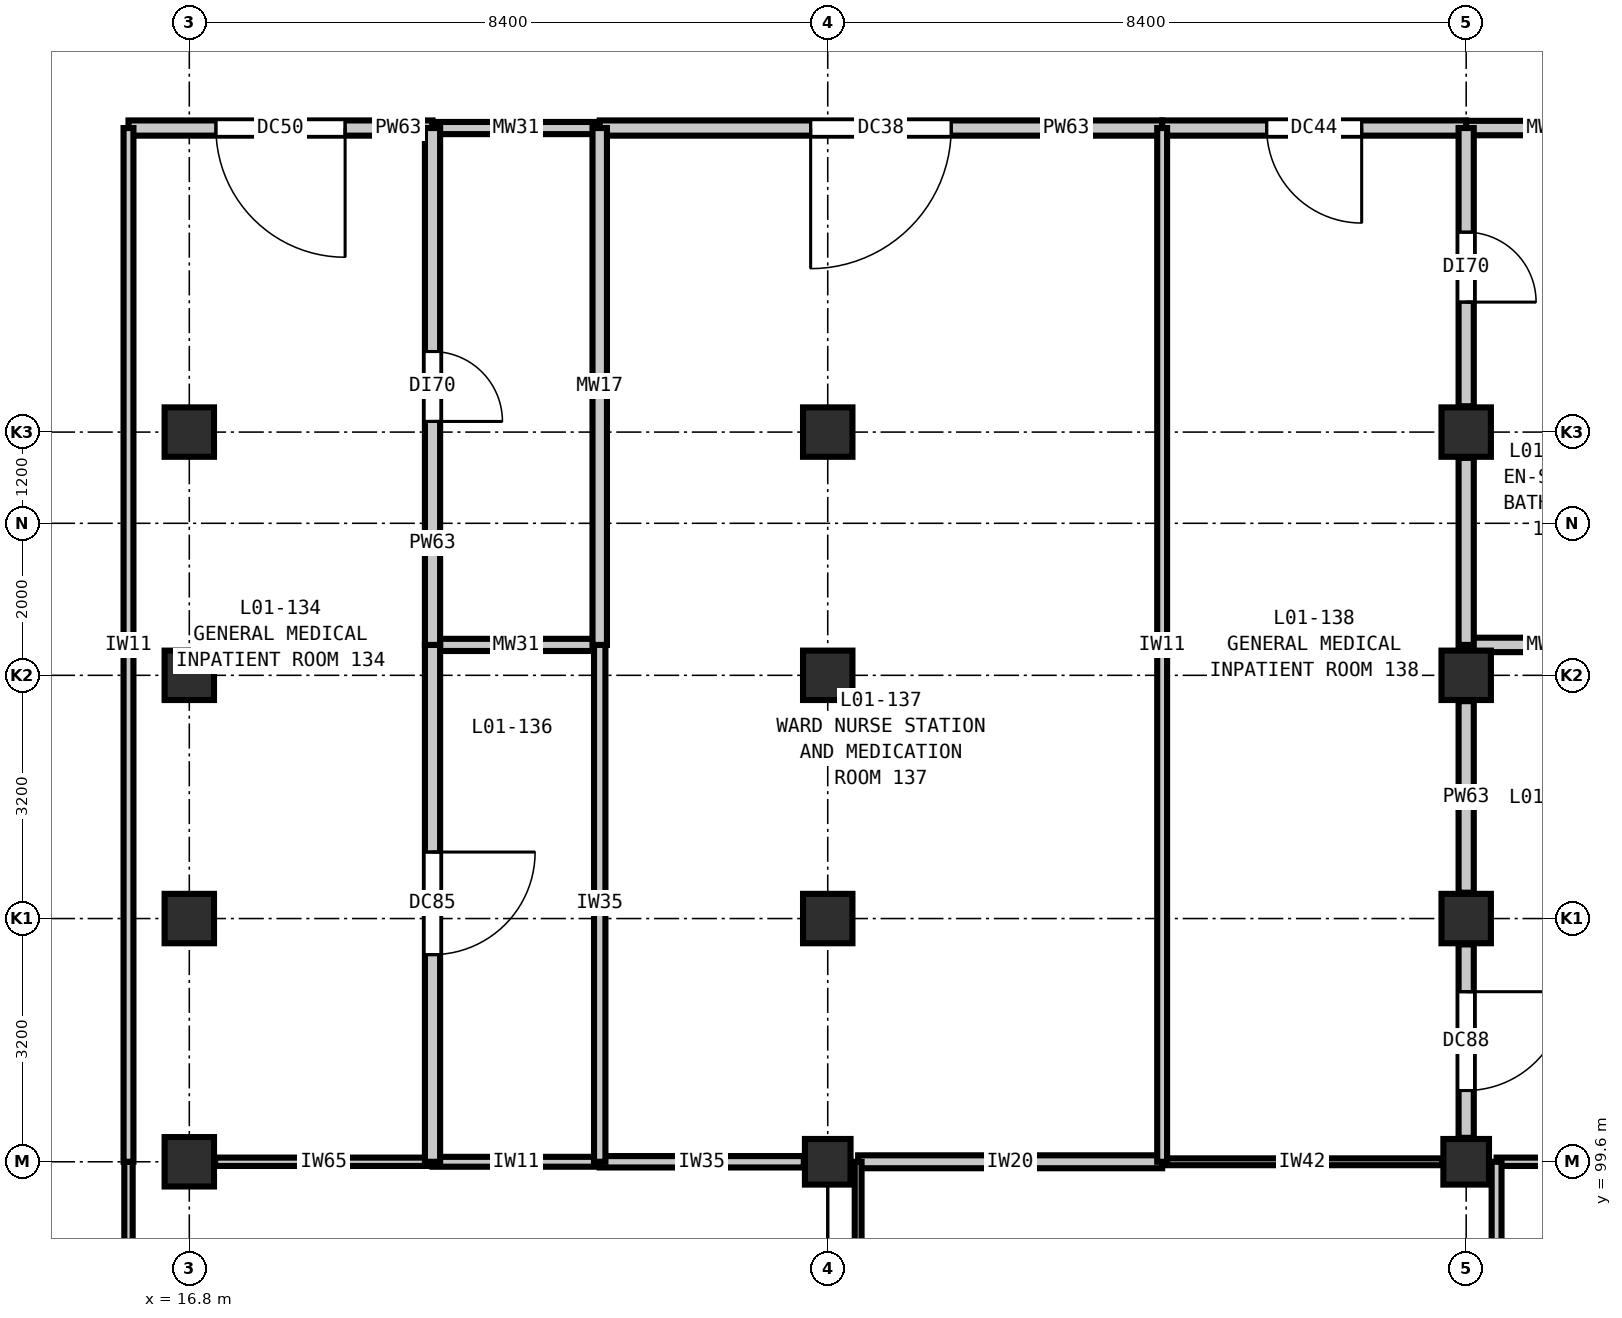
"""IFC4 building model, lengths in metres.
Left out: names, types, materials, properties, quantities, classifications, styles, units other than length and angle.
Written with IfcOpenShell. Run it as: python <this file> out.ifc"""

import sys

from ifc_helpers import new_model, si_unit, direction, frame, frame_2d, origin, origin_2d, place, context, subcontext, project, spatial, rectangle, extrude, element, fill, save


model = new_model("IFC4")
c1 = context("Model", 3, precision=1e-05, world=origin(), true_north=direction((0.0, 1.0)))
c2 = subcontext(c1, "Body", "Model", "MODEL_VIEW")
j1 = project(units=[si_unit("LENGTHUNIT", "METRE"), si_unit("PLANEANGLEUNIT", "RADIAN")], contexts=[c1])
p1 = place(None, origin())
s1 = spatial("IfcSite", under=j1, at=p1, CompositionType="ELEMENT")
p2 = place(p1, origin())
s2 = spatial("IfcBuilding", under=s1, at=p2, CompositionType="ELEMENT")
p3 = place(p2, frame((0.0, 0.0, 5.4)))
s3 = spatial("IfcBuildingStorey", under=s2, at=p3, CompositionType="ELEMENT", Elevation=5.4)
for number, where, z_axis, x_axis in (
    (1, (16.8, 99.6, 0.0), (0.0, 0.0, 1.0), (1.0, 0.0, 0.0)),
    (2, (16.8, 102.8, 0.0), (0.0, 0.0, 1.0), (1.0, 0.0, 0.0)),
    (3, (16.8, 106.0, 0.0), (0.0, 0.0, 1.0), (1.0, 0.0, 0.0)),
    (4, (16.8, 109.2, 0.0), (0.0, 0.0, 1.0), (1.0, 0.0, 0.0)),
):
    element("IfcColumn", number, at=place(p3, frame(where, z_axis=z_axis, x_axis=x_axis)), inside=s3, PredefinedType="COLUMN", context=c2, shape_type="SweptSolid", body=[
        extrude(rectangle(XDim=0.65, YDim=0.65, at=origin_2d()), origin(), (0.0, 0.0, 1.0), 5.4),
    ])
p4 = place(p3, frame((25.2, 99.6, 0.0), z_axis=(0.0, 0.0, 1.0), x_axis=(1.0, 0.0, 0.0)))
e5 = element("IfcColumn", 5, at=p4, inside=s3, PredefinedType="COLUMN", context=c2, shape_type="SweptSolid", body=[
    extrude(rectangle(XDim=0.6, YDim=0.6, at=origin_2d()), origin(), (0.0, 0.0, 1.0), 5.4),
])
for number, where, z_axis, x_axis in (
    (6, (25.2, 102.8, 0.0), (0.0, 0.0, 1.0), (1.0, 0.0, 0.0)),
    (7, (25.2, 106.0, 0.0), (0.0, 0.0, 1.0), (1.0, 0.0, 0.0)),
    (8, (25.2, 109.2, 0.0), (0.0, 0.0, 1.0), (1.0, 0.0, 0.0)),
):
    element("IfcColumn", number, at=place(p3, frame(where, z_axis=z_axis, x_axis=x_axis)), inside=s3, PredefinedType="COLUMN", context=c2, shape_type="SweptSolid", body=[
        extrude(rectangle(XDim=0.65, YDim=0.65, at=origin_2d()), origin(), (0.0, 0.0, 1.0), 5.4),
    ])
p5 = place(p3, frame((33.6, 99.6, 0.0), z_axis=(0.0, 0.0, 1.0), x_axis=(1.0, 0.0, 0.0)))
e9 = element("IfcColumn", 9, at=p5, inside=s3, PredefinedType="COLUMN", context=c2, shape_type="SweptSolid", body=[
    extrude(rectangle(XDim=0.6, YDim=0.6, at=origin_2d()), origin(), (0.0, 0.0, 1.0), 5.4),
])
for number, where, z_axis, x_axis in (
    (10, (33.6, 102.8, 0.0), (0.0, 0.0, 1.0), (1.0, 0.0, 0.0)),
    (11, (33.6, 106.0, 0.0), (0.0, 0.0, 1.0), (1.0, 0.0, 0.0)),
    (12, (33.6, 109.2, 0.0), (0.0, 0.0, 1.0), (1.0, 0.0, 0.0)),
):
    element("IfcColumn", number, at=place(p3, frame(where, z_axis=z_axis, x_axis=x_axis)), inside=s3, PredefinedType="COLUMN", context=c2, shape_type="SweptSolid", body=[
        extrude(rectangle(XDim=0.65, YDim=0.65, at=origin_2d()), origin(), (0.0, 0.0, 1.0), 5.4),
    ])
p6 = place(p3, frame((17.14, 99.6, 0.0), z_axis=(0.0, 0.0, 1.0), x_axis=(1.0, 0.0, 0.0)))
e13 = element("IfcWall", 13, at=p6, inside=s3, PredefinedType="PARTITIONING", context=c2, shape_type="SweptSolid", body=[
    extrude(rectangle(XDim=2.86, YDim=0.11, at=frame_2d((1.43, 0.0))), origin(), (0.0, 0.0, 1.0), 4.685),
])
p7 = place(p3, frame((20.0, 99.6, 0.0), z_axis=(0.0, 0.0, 1.0), x_axis=(1.0, 0.0, 0.0)))
e14 = element("IfcWall", 14, at=p7, inside=s3, PredefinedType="PARTITIONING", context=c2, shape_type="SweptSolid", body=[
    extrude(rectangle(XDim=2.2, YDim=0.13, at=frame_2d((1.1, 0.0))), origin(), (0.0, 0.0, 1.0), 4.685),
])
p8 = place(p3, frame((22.2, 99.6, 0.0), z_axis=(0.0, 0.0, 1.0), x_axis=(1.0, 0.0, 0.0)))
e15 = element("IfcWall", 15, at=p8, inside=s3, PredefinedType="PARTITIONING", context=c2, shape_type="SweptSolid", body=[
    extrude(rectangle(XDim=2.685, YDim=0.15, at=frame_2d((1.343, 0.0))), origin(), (0.0, 0.0, 1.0), 4.685),
])
p9 = place(p3, frame((25.6, 99.6, 0.0), z_axis=(0.0, 0.0, 1.0), x_axis=(1.0, 0.0, 0.0)))
e16 = element("IfcWall", 16, at=p9, inside=s3, PredefinedType="PARTITIONING", context=c2, shape_type="SweptSolid", body=[
    extrude(rectangle(XDim=4.0, YDim=0.17, at=frame_2d((2.0, 0.0))), origin(), (0.0, 0.0, 1.0), 4.685),
])
p10 = place(p3, frame((29.6, 99.6, 0.0), z_axis=(0.0, 0.0, 1.0), x_axis=(1.0, 0.0, 0.0)))
e17 = element("IfcWall", 17, at=p10, inside=s3, PredefinedType="PARTITIONING", context=c2, shape_type="SweptSolid", body=[
    extrude(rectangle(XDim=3.685, YDim=0.09, at=frame_2d((1.842, 0.0))), origin(), (0.0, 0.0, 1.0), 4.685),
])
p11 = place(p3, frame((34.0, 99.6, 0.0), z_axis=(0.0, 0.0, 1.0), x_axis=(1.0, 0.0, 0.0)))
e18 = element("IfcWall", 18, at=p11, inside=s3, PredefinedType="PARTITIONING", context=c2, shape_type="SweptSolid", body=[
    extrude(rectangle(XDim=1.8, YDim=0.11, at=frame_2d((0.9, 0.0))), origin(), (0.0, 0.0, 1.0), 4.685),
])
p12 = place(p3, frame((20.0, 106.4, 0.0), z_axis=(0.0, 0.0, 1.0), x_axis=(1.0, 0.0, 0.0)))
e19 = element("IfcWall", 19, at=p12, inside=s3, PredefinedType="PLUMBINGWALL", context=c2, shape_type="SweptSolid", body=[
    extrude(rectangle(XDim=2.2, YDim=0.16, at=frame_2d((1.1, 0.0))), origin(), (0.0, 0.0, 1.0), 5.05),
])
p13 = place(p3, frame((33.6, 106.4, 0.0), z_axis=(0.0, 0.0, 1.0), x_axis=(1.0, 0.0, 0.0)))
e20 = element("IfcWall", 20, at=p13, inside=s3, PredefinedType="PLUMBINGWALL", context=c2, shape_type="SweptSolid", body=[
    extrude(rectangle(XDim=2.2, YDim=0.19, at=frame_2d((1.1, 0.0))), origin(), (0.0, 0.0, 1.0), 5.05),
])
p14 = place(p3, frame((16.0, 113.2, 0.0), z_axis=(0.0, 0.0, 1.0), x_axis=(1.0, 0.0, 0.0)))
e21 = element("IfcWall", 21, at=p14, inside=s3, PredefinedType="PARTITIONING", context=c2, shape_type="SweptSolid", body=[
    extrude(rectangle(XDim=4.0, YDim=0.2, at=frame_2d((2.0, 0.0))), origin(), (0.0, 0.0, 1.0), 5.05),
])
p15 = place(p14, frame((1.15, 0.0, 0.0)))
e22 = element("IfcOpeningElement", 22, at=p15, cuts=e21, PredefinedType="OPENING", context=c2, shape_type="SweptSolid", body=[
    extrude(rectangle(XDim=1.7, YDim=2.3, at=frame_2d((0.85, 1.15))), frame((0.0, 0.11, 0.0), z_axis=(0.0, -1.0, 0.0), x_axis=(1.0, 0.0, 0.0)), (0.0, 0.0, 1.0), 0.22),
])
p16 = place(p3, frame((20.0, 113.2, 0.0), z_axis=(0.0, 0.0, 1.0), x_axis=(1.0, 0.0, 0.0)))
e23 = element("IfcWall", 23, at=p16, inside=s3, PredefinedType="PLUMBINGWALL", context=c2, shape_type="SweptSolid", body=[
    extrude(rectangle(XDim=2.2, YDim=0.16, at=frame_2d((1.1, 0.0))), origin(), (0.0, 0.0, 1.0), 5.05),
])
p17 = place(p3, frame((22.2, 113.2, 0.0), z_axis=(0.0, 0.0, 1.0), x_axis=(1.0, 0.0, 0.0)))
e24 = element("IfcWall", 24, at=p17, inside=s3, PredefinedType="PARTITIONING", context=c2, shape_type="SweptSolid", body=[
    extrude(rectangle(XDim=7.4, YDim=0.2, at=frame_2d((3.7, 0.0))), origin(), (0.0, 0.0, 1.0), 5.05),
])
p18 = place(p17, frame((2.775, 0.0, 0.0)))
e25 = element("IfcOpeningElement", 25, at=p18, cuts=e24, PredefinedType="OPENING", context=c2, shape_type="SweptSolid", body=[
    extrude(rectangle(XDim=1.85, YDim=2.3, at=frame_2d((0.925, 1.15))), frame((0.0, 0.11, 0.0), z_axis=(0.0, -1.0, 0.0), x_axis=(1.0, 0.0, 0.0)), (0.0, 0.0, 1.0), 0.22),
])
p19 = place(p3, frame((29.6, 113.2, 0.0), z_axis=(0.0, 0.0, 1.0), x_axis=(1.0, 0.0, 0.0)))
e26 = element("IfcWall", 26, at=p19, inside=s3, PredefinedType="PARTITIONING", context=c2, shape_type="SweptSolid", body=[
    extrude(rectangle(XDim=4.0, YDim=0.2, at=frame_2d((2.0, 0.0))), origin(), (0.0, 0.0, 1.0), 5.05),
])
p20 = place(p19, frame((1.375, 0.0, 0.0)))
e27 = element("IfcOpeningElement", 27, at=p20, cuts=e26, PredefinedType="OPENING", context=c2, shape_type="SweptSolid", body=[
    extrude(rectangle(XDim=1.25, YDim=2.15, at=frame_2d((0.625, 1.075))), frame((0.0, 0.11, 0.0), z_axis=(0.0, -1.0, 0.0), x_axis=(1.0, 0.0, 0.0)), (0.0, 0.0, 1.0), 0.22),
])
p21 = place(p3, frame((33.6, 113.2, 0.0), z_axis=(0.0, 0.0, 1.0), x_axis=(1.0, 0.0, 0.0)))
e28 = element("IfcWall", 28, at=p21, inside=s3, PredefinedType="PLUMBINGWALL", context=c2, shape_type="SweptSolid", body=[
    extrude(rectangle(XDim=2.2, YDim=0.19, at=frame_2d((1.1, 0.0))), origin(), (0.0, 0.0, 1.0), 5.05),
])
p22 = place(p3, frame((16.0, 88.6, 0.0), z_axis=(0.0, 0.0, 1.0), x_axis=(0.0, 1.0, 0.0)))
e29 = element("IfcWall", 29, at=p22, inside=s3, PredefinedType="PARTITIONING", context=c2, shape_type="SweptSolid", body=[
    extrude(rectangle(XDim=11.0, YDim=0.11, at=frame_2d((5.5, 0.0))), origin(), (0.0, 0.0, 1.0), 5.05),
])
p23 = place(p3, frame((16.0, 99.6, 0.0), z_axis=(0.0, 0.0, 1.0), x_axis=(0.0, 1.0, 0.0)))
e30 = element("IfcWall", 30, at=p23, inside=s3, PredefinedType="PARTITIONING", context=c2, shape_type="SweptSolid", body=[
    extrude(rectangle(XDim=13.6, YDim=0.13, at=frame_2d((6.8, 0.0))), origin(), (0.0, 0.0, 1.0), 5.05),
])
p24 = place(p3, frame((20.0, 99.6, 0.0), z_axis=(0.0, 0.0, 1.0), x_axis=(0.0, 1.0, 0.0)))
e31 = element("IfcWall", 31, at=p24, inside=s3, PredefinedType="PARTITIONING", context=c2, shape_type="SweptSolid", body=[
    extrude(rectangle(XDim=6.8, YDim=0.2, at=frame_2d((3.4, 0.0))), origin(), (0.0, 0.0, 1.0), 5.05),
])
p25 = place(p24, frame((2.725, 0.0, 0.0)))
e32 = element("IfcOpeningElement", 32, at=p25, cuts=e31, PredefinedType="OPENING", context=c2, shape_type="SweptSolid", body=[
    extrude(rectangle(XDim=1.35, YDim=2.2, at=frame_2d((0.675, 1.1))), frame((0.0, 0.11, 0.0), z_axis=(0.0, -1.0, 0.0), x_axis=(1.0, 0.0, 0.0)), (0.0, 0.0, 1.0), 0.22),
])
p26 = place(p3, frame((20.0, 106.4, 0.0), z_axis=(0.0, 0.0, 1.0), x_axis=(0.0, 1.0, 0.0)))
e33 = element("IfcWall", 33, at=p26, inside=s3, PredefinedType="PARTITIONING", context=c2, shape_type="SweptSolid", body=[
    extrude(rectangle(XDim=6.8, YDim=0.2, at=frame_2d((3.4, 0.0))), origin(), (0.0, 0.0, 1.0), 5.05),
])
p27 = place(p26, frame((2.94, 0.0, 0.0)))
e34 = element("IfcOpeningElement", 34, at=p27, cuts=e33, PredefinedType="OPENING", context=c2, shape_type="SweptSolid", body=[
    extrude(rectangle(XDim=0.92, YDim=2.1, at=frame_2d((0.46, 1.05))), frame((0.0, 0.11, 0.0), z_axis=(0.0, -1.0, 0.0), x_axis=(1.0, 0.0, 0.0)), (0.0, 0.0, 1.0), 0.22),
])
p28 = place(p3, frame((22.2, 99.6, 0.0), z_axis=(0.0, 0.0, 1.0), x_axis=(0.0, 1.0, 0.0)))
e35 = element("IfcWall", 35, at=p28, inside=s3, PredefinedType="PARTITIONING", context=c2, shape_type="SweptSolid", body=[
    extrude(rectangle(XDim=6.8, YDim=0.15, at=frame_2d((3.4, 0.0))), origin(), (0.0, 0.0, 1.0), 5.05),
])
p29 = place(p3, frame((22.2, 106.4, 0.0), z_axis=(0.0, 0.0, 1.0), x_axis=(0.0, 1.0, 0.0)))
e36 = element("IfcWall", 36, at=p29, inside=s3, PredefinedType="PLUMBINGWALL", context=c2, shape_type="SweptSolid", body=[
    extrude(rectangle(XDim=6.8, YDim=0.19, at=frame_2d((3.4, 0.0))), origin(), (0.0, 0.0, 1.0), 5.05),
])
p30 = place(p3, frame((25.6, 88.6, 0.0), z_axis=(0.0, 0.0, 1.0), x_axis=(0.0, 1.0, 0.0)))
e37 = element("IfcWall", 37, at=p30, inside=s3, PredefinedType="PARTITIONING", context=c2, shape_type="SweptSolid", body=[
    extrude(rectangle(XDim=11.0, YDim=0.09, at=frame_2d((5.5, 0.0))), origin(), (0.0, 0.0, 1.0), 5.05),
])
p31 = place(p3, frame((29.6, 99.6, 0.0), z_axis=(0.0, 0.0, 1.0), x_axis=(0.0, 1.0, 0.0)))
e38 = element("IfcWall", 38, at=p31, inside=s3, PredefinedType="PARTITIONING", context=c2, shape_type="SweptSolid", body=[
    extrude(rectangle(XDim=13.6, YDim=0.13, at=frame_2d((6.8, 0.0))), origin(), (0.0, 0.0, 1.0), 5.05),
])
p32 = place(p3, frame((33.6, 99.915, 0.0), z_axis=(0.0, 0.0, 1.0), x_axis=(0.0, 1.0, 0.0)))
e39 = element("IfcWall", 39, at=p32, inside=s3, PredefinedType="PARTITIONING", context=c2, shape_type="SweptSolid", body=[
    extrude(rectangle(XDim=2.545, YDim=0.2, at=frame_2d((1.272, 0.0))), origin(), (0.0, 0.0, 1.0), 4.735),
])
p33 = place(p32, frame((0.623, 0.0, 0.0)))
e40 = element("IfcOpeningElement", 40, at=p33, cuts=e39, PredefinedType="OPENING", context=c2, shape_type="SweptSolid", body=[
    extrude(rectangle(XDim=1.3, YDim=2.2, at=frame_2d((0.65, 1.1))), frame((0.0, 0.11, 0.0), z_axis=(0.0, -1.0, 0.0), x_axis=(1.0, 0.0, 0.0)), (0.0, 0.0, 1.0), 0.22),
])
p34 = place(p3, frame((33.6, 103.14, 0.0), z_axis=(0.0, 0.0, 1.0), x_axis=(0.0, 1.0, 0.0)))
e41 = element("IfcWall", 41, at=p34, inside=s3, PredefinedType="PARTITIONING", context=c2, shape_type="SweptSolid", body=[
    extrude(rectangle(XDim=2.52, YDim=0.2, at=frame_2d((1.26, 0.0))), origin(), (0.0, 0.0, 1.0), 4.735),
])
p35 = place(p3, frame((33.6, 109.54, 0.0), z_axis=(0.0, 0.0, 1.0), x_axis=(0.0, 1.0, 0.0)))
e42 = element("IfcWall", 42, at=p35, inside=s3, PredefinedType="PARTITIONING", context=c2, shape_type="SweptSolid", body=[
    extrude(rectangle(XDim=3.66, YDim=0.2, at=frame_2d((1.83, 0.0))), origin(), (0.0, 0.0, 1.0), 4.735),
])
p36 = place(p35, frame((1.37, 0.0, 0.0)))
e43 = element("IfcOpeningElement", 43, at=p36, cuts=e42, PredefinedType="OPENING", context=c2, shape_type="SweptSolid", body=[
    extrude(rectangle(XDim=0.92, YDim=2.1, at=frame_2d((0.46, 1.05))), frame((0.0, 0.11, 0.0), z_axis=(0.0, -1.0, 0.0), x_axis=(1.0, 0.0, 0.0)), (0.0, 0.0, 1.0), 0.22),
])
p37 = place(p3, frame((33.6, 106.4, 0.0), z_axis=(0.0, 0.0, 1.0), x_axis=(0.0, 1.0, 0.0)))
e44 = element("IfcWall", 44, at=p37, inside=s3, PredefinedType="PARTITIONING", context=c2, shape_type="SweptSolid", body=[
    extrude(rectangle(XDim=2.46, YDim=0.2, at=frame_2d((1.23, 0.0))), origin(), (0.0, 0.0, 1.0), 4.735),
])
p38 = place(p3, frame((34.0, 88.6, 0.0), z_axis=(0.0, 0.0, 1.0), x_axis=(0.0, 1.0, 0.0)))
e45 = element("IfcWall", 45, at=p38, inside=s3, PredefinedType="PARTITIONING", context=c2, shape_type="SweptSolid", body=[
    extrude(rectangle(XDim=11.0, YDim=0.13, at=frame_2d((5.5, 0.0))), origin(), (0.0, 0.0, 1.0), 5.05),
])
p39 = place(p15, frame((1.7, 0.0, 0.0), z_axis=(0.0, 0.0, 1.0), x_axis=(-1.0, 0.0, 0.0)))
e46 = element("IfcDoor", 46, at=p39, inside=s3, OperationType="SINGLE_SWING_LEFT", PredefinedType="DOOR", context=c2, shape_type="SweptSolid", body=[
    extrude(rectangle(XDim=1.7, YDim=2.3, at=frame_2d((0.85, 1.15))), frame((0.0, 0.025, 0.0), z_axis=(0.0, -1.0, 0.0), x_axis=(1.0, 0.0, 0.0)), (0.0, 0.0, 1.0), 0.05),
])
fill(e22, e46)
p40 = place(p18, frame((1.85, 0.0, 0.0), z_axis=(0.0, 0.0, 1.0), x_axis=(-1.0, 0.0, 0.0)))
e47 = element("IfcDoor", 47, at=p40, inside=s3, OperationType="SINGLE_SWING_RIGHT", PredefinedType="DOOR", context=c2, shape_type="SweptSolid", body=[
    extrude(rectangle(XDim=1.85, YDim=2.3, at=frame_2d((0.925, 1.15))), frame((0.0, 0.025, 0.0), z_axis=(0.0, -1.0, 0.0), x_axis=(1.0, 0.0, 0.0)), (0.0, 0.0, 1.0), 0.05),
])
fill(e25, e47)
p41 = place(p20, frame((1.25, 0.0, 0.0), z_axis=(0.0, 0.0, 1.0), x_axis=(-1.0, 0.0, 0.0)))
e48 = element("IfcDoor", 48, at=p41, inside=s3, OperationType="SINGLE_SWING_LEFT", PredefinedType="DOOR", context=c2, shape_type="SweptSolid", body=[
    extrude(rectangle(XDim=1.25, YDim=2.15, at=frame_2d((0.625, 1.075))), frame((0.0, 0.025, 0.0), z_axis=(0.0, -1.0, 0.0), x_axis=(1.0, 0.0, 0.0)), (0.0, 0.0, 1.0), 0.05),
])
fill(e27, e48)
p42 = place(p25, frame((1.35, 0.0, 0.0), z_axis=(0.0, 0.0, 1.0), x_axis=(-1.0, 0.0, 0.0)))
e49 = element("IfcDoor", 49, at=p42, inside=s3, OperationType="SINGLE_SWING_LEFT", PredefinedType="DOOR", context=c2, shape_type="SweptSolid", body=[
    extrude(rectangle(XDim=1.35, YDim=2.2, at=frame_2d((0.675, 1.1))), frame((0.0, 0.025, 0.0), z_axis=(0.0, -1.0, 0.0), x_axis=(1.0, 0.0, 0.0)), (0.0, 0.0, 1.0), 0.05),
])
fill(e32, e49)
p43 = place(p27, frame((0.92, 0.0, 0.0), z_axis=(0.0, 0.0, 1.0), x_axis=(-1.0, 0.0, 0.0)))
e50 = element("IfcDoor", 50, at=p43, inside=s3, OperationType="SINGLE_SWING_RIGHT", PredefinedType="DOOR", context=c2, shape_type="SweptSolid", body=[
    extrude(rectangle(XDim=0.92, YDim=2.1, at=frame_2d((0.46, 1.05))), frame((0.0, 0.025, 0.0), z_axis=(0.0, -1.0, 0.0), x_axis=(1.0, 0.0, 0.0)), (0.0, 0.0, 1.0), 0.05),
])
fill(e34, e50)
p44 = place(p33, frame((1.3, 0.0, 0.0), z_axis=(0.0, 0.0, 1.0), x_axis=(-1.0, 0.0, 0.0)))
e51 = element("IfcDoor", 51, at=p44, inside=s3, OperationType="SINGLE_SWING_LEFT", PredefinedType="DOOR", context=c2, shape_type="SweptSolid", body=[
    extrude(rectangle(XDim=1.3, YDim=2.2, at=frame_2d((0.65, 1.1))), frame((0.0, 0.025, 0.0), z_axis=(0.0, -1.0, 0.0), x_axis=(1.0, 0.0, 0.0)), (0.0, 0.0, 1.0), 0.05),
])
fill(e40, e51)
p45 = place(p36, frame((0.92, 0.0, 0.0), z_axis=(0.0, 0.0, 1.0), x_axis=(-1.0, 0.0, 0.0)))
e52 = element("IfcDoor", 52, at=p45, inside=s3, OperationType="SINGLE_SWING_RIGHT", PredefinedType="DOOR", context=c2, shape_type="SweptSolid", body=[
    extrude(rectangle(XDim=0.92, YDim=2.1, at=frame_2d((0.46, 1.05))), frame((0.0, 0.025, 0.0), z_axis=(0.0, -1.0, 0.0), x_axis=(1.0, 0.0, 0.0)), (0.0, 0.0, 1.0), 0.05),
])
fill(e43, e52)
save(model, sys.argv[1])
